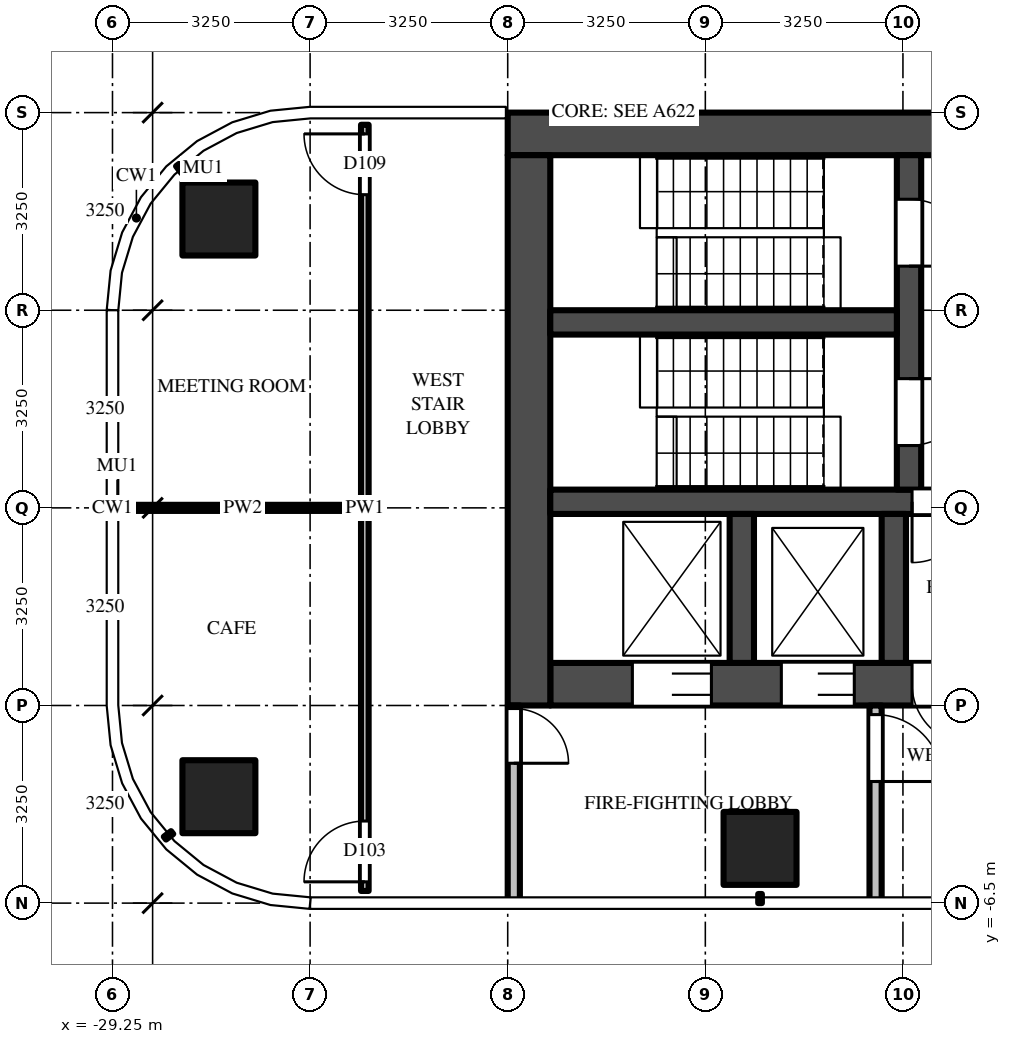
"""IFC4 building model, lengths in metres.
Left out: names, types, materials, properties, quantities, classifications, styles, units other than length and angle.
Written with IfcOpenShell. Run it as: python <this file> out.ifc"""

import sys

from ifc_helpers import new_model, si_unit, direction, frame, frame_2d, origin, origin_2d, place, context, subcontext, project, spatial, rectangle, extrude, source, transform, mapped, element, fill, save


model = new_model("IFC4")
c1 = context("Model", 3, precision=1e-05, world=origin(), true_north=direction((0.0, 1.0)))
c2 = subcontext(c1, "Body", "Model", "MODEL_VIEW")
j1 = project(units=[si_unit("LENGTHUNIT", "METRE"), si_unit("PLANEANGLEUNIT", "RADIAN")], contexts=[c1])
p1 = place(None, origin())
s1 = spatial("IfcSite", under=j1, at=p1, CompositionType="ELEMENT")
p2 = place(p1, origin())
s2 = spatial("IfcBuilding", under=s1, at=p2, CompositionType="ELEMENT")
p3 = place(p2, frame((0.0, 0.0, 189.3)))
s3 = spatial("IfcBuildingStorey", under=s2, at=p3, CompositionType="ELEMENT", Elevation=189.3)
m1 = source(origin(), c2, "Body", "SweptSolid", [
    extrude(rectangle(XDim=1.2, YDim=1.2, at=origin_2d()), origin(), (0.0, 0.0, 1.0), 3.9),
])
for number, where, z_axis, x_axis in (
    (1, (-18.6, -5.6, 0.0), (0.0, 0.0, 1.0), (1.0, 0.0, 0.0)),
    (2, (-27.5, -4.75, 0.0), (0.0, 0.0, 1.0), (1.0, 0.0, 0.0)),
    (3, (-27.5, 4.75, 0.0), (0.0, 0.0, 1.0), (1.0, 0.0, 0.0)),
):
    element("IfcColumn", number, at=place(p3, frame(where, z_axis=z_axis, x_axis=x_axis)), inside=s3, PredefinedType="COLUMN", context=c2, shape_type="MappedRepresentation", body=[
        mapped(m1, transform((0.0, 0.0, 0.0))),
    ])
m2 = source(origin(), c2, "Body", "SweptSolid", [
    extrude(rectangle(XDim=16.55, YDim=0.7, at=frame_2d((8.275, 0.0))), origin(), (0.0, 0.0, 1.0), 3.7),
])
p4 = place(p3, frame((-6.2, 6.15, 0.0), z_axis=(0.0, 0.0, 1.0), x_axis=(-1.0, 0.0, 0.0)))
e4 = element("IfcWall", 4, at=p4, inside=s3, PredefinedType="SHEAR", context=c2, shape_type="MappedRepresentation", body=[
    mapped(m2, transform((0.0, 0.0, 0.0))),
])
m3 = source(origin(), c2, "Body", "SweptSolid", [
    extrude(rectangle(XDim=14.85, YDim=0.7, at=frame_2d((7.425, 0.0))), origin(), (0.0, 0.0, 1.0), 3.7),
])
p5 = place(p3, frame((-7.2, -2.9, 0.0), z_axis=(0.0, 0.0, 1.0), x_axis=(-1.0, 0.0, 0.0)))
e5 = element("IfcWall", 5, at=p5, inside=s3, PredefinedType="SHEAR", context=c2, shape_type="MappedRepresentation", body=[
    mapped(m3, transform((0.0, 0.0, 0.0))),
])
m4 = source(origin(), c2, "Body", "SweptSolid", [
    extrude(rectangle(XDim=1.1, YDim=2.1, at=frame_2d((0.55, 1.05))), frame((0.0, 0.36, 0.0), z_axis=(0.0, -1.0, 0.0), x_axis=(1.0, 0.0, 0.0)), (0.0, 0.0, 1.0), 0.72),
])
p6 = place(p5, frame((0.55, 0.0, 0.0)))
e6 = element("IfcOpeningElement", 6, at=p6, cuts=e5, PredefinedType="OPENING", context=c2, shape_type="MappedRepresentation", body=[
    mapped(m4, transform((0.0, 0.0, 0.0))),
])
p7 = place(p5, frame((3.15, 0.0, 0.0)))
e7 = element("IfcOpeningElement", 7, at=p7, cuts=e5, PredefinedType="OPENING", context=c2, shape_type="MappedRepresentation", body=[
    mapped(m4, transform((0.0, 0.0, 0.0))),
])
m5 = source(origin(), c2, "Body", "SweptSolid", [
    extrude(rectangle(XDim=1.2, YDim=2.1, at=frame_2d((0.6, 1.05))), frame((0.0, 0.36, 0.0), z_axis=(0.0, -1.0, 0.0), x_axis=(1.0, 0.0, 0.0)), (0.0, 0.0, 1.0), 0.72),
])
p8 = place(p5, frame((5.7, 0.0, 0.0)))
e8 = element("IfcOpeningElement", 8, at=p8, cuts=e5, PredefinedType="OPENING", context=c2, shape_type="MappedRepresentation", body=[
    mapped(m5, transform((0.0, 0.0, 0.0))),
])
m6 = source(origin(), c2, "Body", "SweptSolid", [
    extrude(rectangle(XDim=1.3, YDim=2.1, at=frame_2d((0.65, 1.05))), frame((0.0, 0.36, 0.0), z_axis=(0.0, -1.0, 0.0), x_axis=(1.0, 0.0, 0.0)), (0.0, 0.0, 1.0), 0.72),
])
p9 = place(p5, frame((12.2, 0.0, 0.0)))
e9 = element("IfcOpeningElement", 9, at=p9, cuts=e5, PredefinedType="OPENING", context=c2, shape_type="MappedRepresentation", body=[
    mapped(m6, transform((0.0, 0.0, 0.0))),
])
p10 = place(p5, frame((9.85, 0.0, 0.0)))
e10 = element("IfcOpeningElement", 10, at=p10, cuts=e5, PredefinedType="OPENING", context=c2, shape_type="MappedRepresentation", body=[
    mapped(m5, transform((0.0, 0.0, 0.0))),
])
m7 = source(origin(), c2, "Body", "SweptSolid", [
    extrude(rectangle(XDim=1.0, YDim=2.1, at=frame_2d((0.5, 1.05))), frame((0.0, 0.36, 0.0), z_axis=(0.0, -1.0, 0.0), x_axis=(1.0, 0.0, 0.0)), (0.0, 0.0, 1.0), 0.72),
])
p11 = place(p5, frame((7.9, 0.0, 0.0)))
e11 = element("IfcOpeningElement", 11, at=p11, cuts=e5, PredefinedType="OPENING", context=c2, shape_type="MappedRepresentation", body=[
    mapped(m7, transform((0.0, 0.0, 0.0))),
])
m8 = source(origin(), c2, "Body", "SweptSolid", [
    extrude(rectangle(XDim=9.05, YDim=0.7, at=frame_2d((4.525, 0.0))), origin(), (0.0, 0.0, 1.0), 3.7),
])
p12 = place(p3, frame((-22.4, 5.8, 0.0), z_axis=(0.0, 0.0, 1.0), x_axis=(0.0, -1.0, 0.0)))
e12 = element("IfcWall", 12, at=p12, inside=s3, PredefinedType="SHEAR", context=c2, shape_type="MappedRepresentation", body=[
    mapped(m8, transform((0.0, 0.0, 0.0))),
])
m9 = source(origin(), c2, "Body", "SweptSolid", [
    extrude(rectangle(XDim=14.85, YDim=0.4, at=frame_2d((7.425, 0.0))), origin(), (0.0, 0.0, 1.0), 3.7),
])
p13 = place(p3, frame((-7.2, 0.1, 0.0), z_axis=(0.0, 0.0, 1.0), x_axis=(-1.0, 0.0, 0.0)))
e13 = element("IfcWall", 13, at=p13, inside=s3, PredefinedType="SHEAR", context=c2, shape_type="MappedRepresentation", body=[
    mapped(m9, transform((0.0, 0.0, 0.0))),
])
m10 = source(origin(), c2, "Body", "SweptSolid", [
    extrude(rectangle(XDim=1.0, YDim=2.1, at=frame_2d((0.5, 1.05))), frame((0.0, 0.21, 0.0), z_axis=(0.0, -1.0, 0.0), x_axis=(1.0, 0.0, 0.0)), (0.0, 0.0, 1.0), 0.42),
])
p14 = place(p13, frame((7.9, 0.0, 0.0)))
e14 = element("IfcOpeningElement", 14, at=p14, cuts=e13, PredefinedType="OPENING", context=c2, shape_type="MappedRepresentation", body=[
    mapped(m10, transform((0.0, 0.0, 0.0))),
])
m11 = source(origin(), c2, "Body", "SweptSolid", [
    extrude(rectangle(XDim=5.5, YDim=0.4, at=frame_2d((2.75, 0.0))), origin(), (0.0, 0.0, 1.0), 3.7),
])
p15 = place(p3, frame((-16.15, 5.8, 0.0), z_axis=(0.0, 0.0, 1.0), x_axis=(0.0, -1.0, 0.0)))
e15 = element("IfcWall", 15, at=p15, inside=s3, PredefinedType="SHEAR", context=c2, shape_type="MappedRepresentation", body=[
    mapped(m11, transform((0.0, 0.0, 0.0))),
])
m12 = source(origin(), c2, "Body", "SweptSolid", [
    extrude(rectangle(XDim=1.1, YDim=2.1, at=frame_2d((0.55, 1.05))), frame((0.0, 0.21, 0.0), z_axis=(0.0, -1.0, 0.0), x_axis=(1.0, 0.0, 0.0)), (0.0, 0.0, 1.0), 0.42),
])
p16 = place(p15, frame((0.725, 0.0, 0.0)))
e16 = element("IfcOpeningElement", 16, at=p16, cuts=e15, PredefinedType="OPENING", context=c2, shape_type="MappedRepresentation", body=[
    mapped(m12, transform((0.0, 0.0, 0.0))),
])
p17 = place(p15, frame((3.675, 0.0, 0.0)))
e17 = element("IfcOpeningElement", 17, at=p17, cuts=e15, PredefinedType="OPENING", context=c2, shape_type="MappedRepresentation", body=[
    mapped(m12, transform((0.0, 0.0, 0.0))),
])
m13 = source(origin(), c2, "Body", "SweptSolid", [
    extrude(rectangle(XDim=5.7, YDim=0.4, at=frame_2d((2.85, 0.0))), origin(), (0.0, 0.0, 1.0), 3.7),
])
p18 = place(p3, frame((-16.35, 3.05, 0.0), z_axis=(0.0, 0.0, 1.0), x_axis=(-1.0, 0.0, 0.0)))
e18 = element("IfcWall", 18, at=p18, inside=s3, PredefinedType="SHEAR", context=c2, shape_type="MappedRepresentation", body=[
    mapped(m13, transform((0.0, 0.0, 0.0))),
])
m14 = source(origin(), c2, "Body", "SweptSolid", [
    extrude(rectangle(XDim=2.45, YDim=0.4, at=frame_2d((1.225, 0.0))), origin(), (0.0, 0.0, 1.0), 3.7),
])
for number, where, z_axis, x_axis in (
    (19, (-16.4, -0.1, 0.0), (0.0, 0.0, 1.0), (0.0, -1.0, 0.0)),
    (20, (-18.9, -0.1, 0.0), (0.0, 0.0, 1.0), (0.0, -1.0, 0.0)),
):
    element("IfcWall", number, at=place(p3, frame(where, z_axis=z_axis, x_axis=x_axis)), inside=s3, PredefinedType="SHEAR", context=c2, shape_type="MappedRepresentation", body=[
        mapped(m14, transform((0.0, 0.0, 0.0))),
    ])
m15 = source(origin(), c2, "Body", "SweptSolid", [
    extrude(rectangle(XDim=3.25, YDim=0.2, at=frame_2d((1.625, 0.0))), origin(), (0.0, 0.0, 1.0), 3.7),
])
p19 = place(p3, frame((-16.7, -3.25, 0.0), z_axis=(0.0, 0.0, 1.0), x_axis=(0.0, -1.0, 0.0)))
e21 = element("IfcWall", 21, at=p19, inside=s3, PredefinedType="PARTITIONING", context=c2, shape_type="MappedRepresentation", body=[
    mapped(m15, transform((0.0, 0.0, 0.0))),
])
m16 = source(origin(), c2, "Body", "SweptSolid", [
    extrude(rectangle(XDim=1.1, YDim=2.1, at=frame_2d((0.55, 1.05))), frame((0.0, 0.11, 0.0), z_axis=(0.0, -1.0, 0.0), x_axis=(1.0, 0.0, 0.0)), (0.0, 0.0, 1.0), 0.22),
])
p20 = place(p19, frame((0.15, 0.0, 0.0)))
e22 = element("IfcOpeningElement", 22, at=p20, cuts=e21, PredefinedType="OPENING", context=c2, shape_type="MappedRepresentation", body=[
    mapped(m16, transform((0.0, 0.0, 0.0))),
])
p21 = place(p3, frame((-22.65, -3.25, 0.0), z_axis=(0.0, 0.0, 1.0), x_axis=(0.0, -1.0, 0.0)))
e23 = element("IfcWall", 23, at=p21, inside=s3, PredefinedType="PARTITIONING", context=c2, shape_type="MappedRepresentation", body=[
    mapped(m15, transform((0.0, 0.0, 0.0))),
])
m17 = source(origin(), c2, "Body", "SweptSolid", [
    extrude(rectangle(XDim=0.9, YDim=2.1, at=frame_2d((0.45, 1.05))), frame((0.0, 0.11, 0.0), z_axis=(0.0, -1.0, 0.0), x_axis=(1.0, 0.0, 0.0)), (0.0, 0.0, 1.0), 0.22),
])
p22 = place(p21, frame((0.05, 0.0, 0.0)))
e24 = element("IfcOpeningElement", 24, at=p22, cuts=e23, PredefinedType="OPENING", context=c2, shape_type="MappedRepresentation", body=[
    mapped(m17, transform((0.0, 0.0, 0.0))),
])
m18 = source(origin(), c2, "Body", "SweptSolid", [
    extrude(rectangle(XDim=12.6, YDim=0.125, at=frame_2d((6.3, 0.0))), origin(), (0.0, 0.0, 1.0), 2.78),
])
p23 = place(p3, frame((-25.1, -6.3, 0.0), z_axis=(0.0, 0.0, 1.0), x_axis=(0.0, 1.0, 0.0)))
e25 = element("IfcWall", 25, at=p23, inside=s3, PredefinedType="PARTITIONING", context=c2, shape_type="MappedRepresentation", body=[
    mapped(m18, transform((0.0, 0.0, 0.0))),
])
m19 = source(origin(), c2, "Body", "SweptSolid", [
    extrude(rectangle(XDim=1.0, YDim=2.1, at=frame_2d((0.5, 1.05))), frame((0.0, 0.073, 0.0), z_axis=(0.0, -1.0, 0.0), x_axis=(1.0, 0.0, 0.0)), (0.0, 0.0, 1.0), 0.145),
])
p24 = place(p23, frame((0.15, 0.0, 0.0)))
e26 = element("IfcOpeningElement", 26, at=p24, cuts=e25, PredefinedType="OPENING", context=c2, shape_type="MappedRepresentation", body=[
    mapped(m19, transform((0.0, 0.0, 0.0))),
])
p25 = place(p23, frame((11.45, 0.0, 0.0)))
e27 = element("IfcOpeningElement", 27, at=p25, cuts=e25, PredefinedType="OPENING", context=c2, shape_type="MappedRepresentation", body=[
    mapped(m19, transform((0.0, 0.0, 0.0))),
])
m20 = source(origin(), c2, "Body", "SweptSolid", [
    extrude(rectangle(XDim=3.887, YDim=0.1, at=frame_2d((1.944, 0.0))), origin(), (0.0, 0.0, 1.0), 2.78),
])
p26 = place(p3, frame((-29.05, 0.0, 0.0), z_axis=(0.0, 0.0, 1.0), x_axis=(1.0, 0.0, 0.0)))
e28 = element("IfcWall", 28, at=p26, inside=s3, PredefinedType="PARTITIONING", context=c2, shape_type="MappedRepresentation", body=[
    mapped(m20, transform((0.0, 0.0, 0.0))),
])
m21 = source(origin(), c2, "Body", "SweptSolid", [
    extrude(rectangle(XDim=1.3, YDim=2.1, at=frame_2d((0.65, 1.05))), frame((0.0, -0.275, 0.0), z_axis=(0.0, -1.0, 0.0), x_axis=(1.0, 0.0, 0.0)), (0.0, 0.0, 1.0), 0.05),
])
p27 = place(p9, origin())
e29 = element("IfcDoor", 29, at=p27, inside=s3, OperationType="DOUBLE_DOOR_SLIDING", PredefinedType="DOOR", context=c2, shape_type="MappedRepresentation", body=[
    mapped(m21, transform((0.0, 0.0, 0.0))),
])
fill(e9, e29)
m22 = source(origin(), c2, "Body", "SweptSolid", [
    extrude(rectangle(XDim=1.2, YDim=2.1, at=frame_2d((0.6, 1.05))), frame((0.0, -0.275, 0.0), z_axis=(0.0, -1.0, 0.0), x_axis=(1.0, 0.0, 0.0)), (0.0, 0.0, 1.0), 0.05),
])
p28 = place(p10, origin())
e30 = element("IfcDoor", 30, at=p28, inside=s3, OperationType="DOUBLE_DOOR_SLIDING", PredefinedType="DOOR", context=c2, shape_type="MappedRepresentation", body=[
    mapped(m22, transform((0.0, 0.0, 0.0))),
])
fill(e10, e30)
m23 = source(origin(), c2, "Body", "SweptSolid", [
    extrude(rectangle(XDim=1.1, YDim=2.1, at=frame_2d((0.55, 1.05))), frame((0.0, 0.025, 0.0), z_axis=(0.0, -1.0, 0.0), x_axis=(1.0, 0.0, 0.0)), (0.0, 0.0, 1.0), 0.05),
])
p29 = place(p16, origin())
e31 = element("IfcDoor", 31, at=p29, inside=s3, OperationType="SINGLE_SWING_RIGHT", PredefinedType="DOOR", context=c2, shape_type="MappedRepresentation", body=[
    mapped(m23, transform((0.0, 0.0, 0.0))),
])
fill(e16, e31)
p30 = place(p17, origin())
e32 = element("IfcDoor", 32, at=p30, inside=s3, OperationType="SINGLE_SWING_LEFT", PredefinedType="DOOR", context=c2, shape_type="MappedRepresentation", body=[
    mapped(m23, transform((0.0, 0.0, 0.0))),
])
fill(e17, e32)
m24 = source(origin(), c2, "Body", "SweptSolid", [
    extrude(rectangle(XDim=1.0, YDim=2.1, at=frame_2d((0.5, 1.05))), frame((0.0, 0.025, 0.0), z_axis=(0.0, -1.0, 0.0), x_axis=(1.0, 0.0, 0.0)), (0.0, 0.0, 1.0), 0.05),
])
p31 = place(p14, origin())
e33 = element("IfcDoor", 33, at=p31, inside=s3, OperationType="SINGLE_SWING_RIGHT", PredefinedType="DOOR", context=c2, shape_type="MappedRepresentation", body=[
    mapped(m24, transform((0.0, 0.0, 0.0))),
])
fill(e14, e33)
m25 = source(origin(), c2, "Body", "SweptSolid", [
    extrude(rectangle(XDim=1.0, YDim=2.1, at=frame_2d((0.5, 1.05))), frame((0.0, -0.275, 0.0), z_axis=(0.0, -1.0, 0.0), x_axis=(1.0, 0.0, 0.0)), (0.0, 0.0, 1.0), 0.05),
])
p32 = place(p11, origin())
e34 = element("IfcDoor", 34, at=p32, inside=s3, OperationType="SINGLE_SWING_LEFT", PredefinedType="DOOR", context=c2, shape_type="MappedRepresentation", body=[
    mapped(m25, transform((0.0, 0.0, 0.0))),
])
fill(e11, e34)
p33 = place(p20, origin())
e35 = element("IfcDoor", 35, at=p33, inside=s3, OperationType="SINGLE_SWING_RIGHT", PredefinedType="DOOR", context=c2, shape_type="MappedRepresentation", body=[
    mapped(m23, transform((0.0, 0.0, 0.0))),
])
fill(e22, e35)
m26 = source(origin(), c2, "Body", "SweptSolid", [
    extrude(rectangle(XDim=0.9, YDim=2.1, at=frame_2d((0.45, 1.05))), frame((0.0, 0.025, 0.0), z_axis=(0.0, -1.0, 0.0), x_axis=(1.0, 0.0, 0.0)), (0.0, 0.0, 1.0), 0.05),
])
p34 = place(p22, origin())
e36 = element("IfcDoor", 36, at=p34, inside=s3, OperationType="SINGLE_SWING_RIGHT", PredefinedType="DOOR", context=c2, shape_type="MappedRepresentation", body=[
    mapped(m26, transform((0.0, 0.0, 0.0))),
])
fill(e24, e36)
p35 = place(p24, origin())
e37 = element("IfcDoor", 37, at=p35, inside=s3, OperationType="SINGLE_SWING_LEFT", PredefinedType="DOOR", context=c2, shape_type="MappedRepresentation", body=[
    mapped(m24, transform((0.0, 0.0, 0.0))),
])
fill(e26, e37)
p36 = place(p25, origin())
e38 = element("IfcDoor", 38, at=p36, inside=s3, OperationType="SINGLE_SWING_RIGHT", PredefinedType="DOOR", context=c2, shape_type="MappedRepresentation", body=[
    mapped(m24, transform((0.0, 0.0, 0.0))),
])
fill(e27, e38)
save(model, sys.argv[1])
